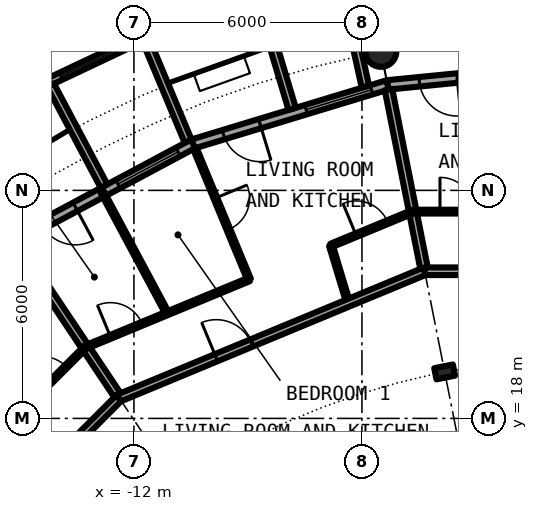
"""IFC4 building model, lengths in metres.
Left out: names, types, materials, properties, quantities, classifications, styles, units other than length and angle.
Written with IfcOpenShell. Run it as: python <this file> out.ifc"""

import sys

from ifc_helpers import new_model, si_unit, direction, frame, frame_2d, origin, origin_2d, place, context, subcontext, project, spatial, rectangle, circle, hollow_circle, i_section, extrude, element, fill, save


model = new_model("IFC4")
c1 = context("Model", 3, precision=1e-05, world=origin(), true_north=direction((0.0, 1.0)))
c2 = subcontext(c1, "Body", "Model", "MODEL_VIEW")
j1 = project(units=[si_unit("LENGTHUNIT", "METRE"), si_unit("PLANEANGLEUNIT", "RADIAN")], contexts=[c1])
p1 = place(None, origin())
s1 = spatial("IfcSite", under=j1, at=p1, CompositionType="ELEMENT")
p2 = place(p1, origin())
s2 = spatial("IfcBuilding", under=s1, at=p2, CompositionType="ELEMENT")
p3 = place(p2, frame((0.0, 0.0, 167.7)))
s3 = spatial("IfcBuildingStorey", under=s2, at=p3, CompositionType="ELEMENT", Elevation=167.7)
p4 = place(p3, frame((-5.501, 27.658, 0.0), z_axis=(0.0, 0.0, 1.0), x_axis=(1.0, 0.0, 0.0)))
e1 = element("IfcColumn", 1, at=p4, inside=s3, PredefinedType="COLUMN", context=c2, shape_type="SweptSolid", body=[
    extrude(hollow_circle(Radius=0.406, WallThickness=0.04, at=origin_2d()), origin(), (0.0, 0.0, 1.0), 3.05),
])
p5 = place(p3, frame((-3.824, 19.223, 0.0), z_axis=(0.0, 0.0, 1.0), x_axis=(-0.195090322016, 0.980785280403, 0.0)))
e2 = element("IfcColumn", 2, at=p5, inside=s3, PredefinedType="COLUMN", context=c2, shape_type="SweptSolid", body=[
    extrude(i_section(OverallWidth=0.3, OverallDepth=0.5, WebThickness=0.014, FlangeThickness=0.028, FilletRadius=0.027, at=origin_2d()), origin(), (0.0, 0.0, 1.0), 3.05),
])
p6 = place(p3, frame((0.0, 27.3, 0.0), z_axis=(0.0, 0.0, 1.0), x_axis=(-0.995173996315, -0.098126026407, 0.0)))
e3 = element("IfcWall", 3, at=p6, inside=s3, PredefinedType="SOLIDWALL", context=c2, shape_type="SweptSolid", body=[
    extrude(rectangle(XDim=5.352, YDim=0.25, at=frame_2d((2.676, 0.0))), origin(), (0.0, 0.0, 1.0), 2.7),
])
p7 = place(p6, frame((0.441, 0.0, 0.3)))
e4 = element("IfcOpeningElement", 4, at=p7, cuts=e3, PredefinedType="OPENING", context=c2, shape_type="SweptSolid", body=[
    extrude(rectangle(XDim=1.8, YDim=2.1, at=frame_2d((0.9, 1.05))), frame((0.0, 0.135, 0.0), z_axis=(0.0, -1.0, 0.0), x_axis=(1.0, 0.0, 0.0)), (0.0, 0.0, 1.0), 0.27),
])
p8 = place(p6, frame((3.51, 0.0, 0.0)))
e5 = element("IfcOpeningElement", 5, at=p8, cuts=e3, PredefinedType="OPENING", context=c2, shape_type="SweptSolid", body=[
    extrude(rectangle(XDim=1.0, YDim=2.2, at=frame_2d((0.5, 1.1))), frame((0.0, 0.135, 0.0), z_axis=(0.0, -1.0, 0.0), x_axis=(1.0, 0.0, 0.0)), (0.0, 0.0, 1.0), 0.27),
])
p9 = place(p3, frame((-5.326, 26.775, 0.0), z_axis=(0.0, 0.0, 1.0), x_axis=(-0.956965678721, -0.290201119486, 0.0)))
e6 = element("IfcWall", 6, at=p9, inside=s3, PredefinedType="SOLIDWALL", context=c2, shape_type="SweptSolid", body=[
    extrude(rectangle(XDim=5.351, YDim=0.25, at=frame_2d((2.676, 0.0))), origin(), (0.0, 0.0, 1.0), 2.7),
])
p10 = place(p9, frame((0.441, 0.0, 0.3)))
e7 = element("IfcOpeningElement", 7, at=p10, cuts=e6, PredefinedType="OPENING", context=c2, shape_type="SweptSolid", body=[
    extrude(rectangle(XDim=1.8, YDim=2.1, at=frame_2d((0.9, 1.05))), frame((0.0, 0.135, 0.0), z_axis=(0.0, -1.0, 0.0), x_axis=(1.0, 0.0, 0.0)), (0.0, 0.0, 1.0), 0.27),
])
p11 = place(p9, frame((3.51, 0.0, 0.0)))
e8 = element("IfcOpeningElement", 8, at=p11, cuts=e6, PredefinedType="OPENING", context=c2, shape_type="SweptSolid", body=[
    extrude(rectangle(XDim=1.0, YDim=2.2, at=frame_2d((0.5, 1.1))), frame((0.0, 0.135, 0.0), z_axis=(0.0, -1.0, 0.0), x_axis=(1.0, 0.0, 0.0)), (0.0, 0.0, 1.0), 0.27),
])
p12 = place(p3, frame((-5.909, 26.729, -0.03), z_axis=(0.0, 0.0, 1.0), x_axis=(-0.216409053917, 0.976302781612, 0.0)))
e9 = element("IfcWall", 9, at=p12, inside=s3, PredefinedType="SOLIDWALL", context=c2, shape_type="SweptSolid", body=[
    extrude(rectangle(XDim=2.925, YDim=0.2, at=frame_2d((1.463, 0.0))), origin(), (0.0, 0.0, 1.0), 2.73),
])
p13 = place(p3, frame((-7.837, 26.144, -0.03), z_axis=(0.0, 0.0, 1.0), x_axis=(-0.287064767992, 0.957911174889, 0.0)))
e10 = element("IfcWall", 10, at=p13, inside=s3, PredefinedType="SOLIDWALL", context=c2, shape_type="SweptSolid", body=[
    extrude(rectangle(XDim=3.006, YDim=0.2, at=frame_2d((1.503, 0.0))), origin(), (0.0, 0.0, 1.0), 2.73),
])
p14 = place(p3, frame((-10.447, 25.222, 0.0), z_axis=(0.0, 0.0, 1.0), x_axis=(-0.881915646801, -0.471407246368, 0.0)))
e11 = element("IfcWall", 11, at=p14, inside=s3, PredefinedType="SOLIDWALL", context=c2, shape_type="SweptSolid", body=[
    extrude(rectangle(XDim=5.352, YDim=0.25, at=frame_2d((2.676, 0.0))), origin(), (0.0, 0.0, 1.0), 2.7),
])
p15 = place(p14, frame((0.441, 0.0, 0.3)))
e12 = element("IfcOpeningElement", 12, at=p15, cuts=e11, PredefinedType="OPENING", context=c2, shape_type="SweptSolid", body=[
    extrude(rectangle(XDim=1.8, YDim=2.1, at=frame_2d((0.9, 1.05))), frame((0.0, 0.135, 0.0), z_axis=(0.0, -1.0, 0.0), x_axis=(1.0, 0.0, 0.0)), (0.0, 0.0, 1.0), 0.27),
])
p16 = place(p14, frame((3.51, 0.0, 0.0)))
e13 = element("IfcOpeningElement", 13, at=p16, cuts=e11, PredefinedType="OPENING", context=c2, shape_type="SweptSolid", body=[
    extrude(rectangle(XDim=1.0, YDim=2.2, at=frame_2d((0.5, 1.1))), frame((0.0, 0.135, 0.0), z_axis=(0.0, -1.0, 0.0), x_axis=(1.0, 0.0, 0.0)), (0.0, 0.0, 1.0), 0.27),
])
p17 = place(p3, frame((-11.629, 28.088, -0.03), z_axis=(0.0, 0.0, 1.0), x_axis=(-0.904000060331, -0.427532327342, 0.0)))
e14 = element("IfcWall", 14, at=p17, inside=s3, PredefinedType="SOLIDWALL", context=c2, shape_type="SweptSolid", body=[
    extrude(rectangle(XDim=2.993, YDim=0.2, at=frame_2d((1.497, 0.0))), origin(), (0.0, 0.0, 1.0), 2.73),
])
p18 = place(p17, frame((0.457, 0.0, 0.33)))
e15 = element("IfcOpeningElement", 15, at=p18, cuts=e14, PredefinedType="OPENING", context=c2, shape_type="SweptSolid", body=[
    extrude(circle(Radius=1.04, at=frame_2d((1.04, 1.04))), frame((0.0, 0.11, 0.0), z_axis=(0.0, -1.0, 0.0), x_axis=(1.0, 0.0, 0.0)), (0.0, 0.0, 1.0), 0.22),
])
p19 = place(p3, frame((-10.575, 25.295, -0.03), z_axis=(0.0, 0.0, 1.0), x_axis=(-0.385697364644, 0.922625353492, 0.0)))
e16 = element("IfcWall", 16, at=p19, inside=s3, PredefinedType="SOLIDWALL", context=c2, shape_type="SweptSolid", body=[
    extrude(rectangle(XDim=2.883, YDim=0.2, at=frame_2d((1.442, 0.0))), origin(), (0.0, 0.0, 1.0), 2.73),
])
p20 = place(p3, frame((-12.787, 24.113, -0.03), z_axis=(0.0, 0.0, 1.0), x_axis=(-0.468365282436, 0.883534924159, 0.0)))
e17 = element("IfcWall", 17, at=p20, inside=s3, PredefinedType="SOLIDWALL", context=c2, shape_type="SweptSolid", body=[
    extrude(rectangle(XDim=3.006, YDim=0.2, at=frame_2d((1.503, 0.0))), origin(), (0.0, 0.0, 1.0), 2.73),
])
p21 = place(p3, frame((-15.098, 22.595, 0.0), z_axis=(0.0, 0.0, 1.0), x_axis=(0.55569370664, -0.831387096605, 0.0)))
e18 = element("IfcWall", 18, at=p21, inside=s3, PredefinedType="PARTITIONING", context=c2, shape_type="SweptSolid", body=[
    extrude(rectangle(XDim=4.875, YDim=0.2, at=frame_2d((2.438, 0.0))), origin(), (0.0, 0.0, 1.0), 2.7),
])
p22 = place(p3, frame((-14.93, 18.222, 0.0), z_axis=(0.0, 0.0, 1.0), x_axis=(0.633633636523, -0.773633255921, 0.0)))
e19 = element("IfcWall", 19, at=p22, inside=s3, PredefinedType="PARTITIONING", context=c2, shape_type="SweptSolid", body=[
    extrude(rectangle(XDim=1.578, YDim=0.1, at=frame_2d((0.789, 0.0))), origin(), (0.0, 0.0, 1.0), 2.7),
])
p23 = place(p3, frame((-12.833, 23.954, 0.0), z_axis=(0.0, 0.0, 1.0), x_axis=(0.472212052488, -0.881484984265, 0.0)))
e20 = element("IfcWall", 20, at=p23, inside=s3, PredefinedType="PARTITIONING", context=c2, shape_type="SweptSolid", body=[
    extrude(rectangle(XDim=3.619, YDim=0.1, at=frame_2d((1.81, 0.0))), origin(), (0.0, 0.0, 1.0), 2.7),
])
p24 = place(p3, frame((-10.399, 25.106, 0.0), z_axis=(0.0, 0.0, 1.0), x_axis=(0.382669377748, -0.923885353999, 0.0)))
e21 = element("IfcWall", 21, at=p24, inside=s3, PredefinedType="PARTITIONING", context=c2, shape_type="SweptSolid", body=[
    extrude(rectangle(XDim=3.734, YDim=0.1, at=frame_2d((1.867, 0.0))), origin(), (0.0, 0.0, 1.0), 2.7),
])
p25 = place(p24, frame((1.417, 0.0, 0.0)))
e22 = element("IfcOpeningElement", 22, at=p25, cuts=e21, PredefinedType="OPENING", context=c2, shape_type="SweptSolid", body=[
    extrude(rectangle(XDim=0.9, YDim=2.3, at=frame_2d((0.45, 1.15))), frame((0.0, 0.06, 0.0), z_axis=(0.0, -1.0, 0.0), x_axis=(1.0, 0.0, 0.0)), (0.0, 0.0, 1.0), 0.12),
])
p26 = place(p3, frame((-6.818, 22.549, 0.0), z_axis=(0.0, 0.0, 1.0), x_axis=(0.289689552287, -0.957120662872, 0.0)))
e23 = element("IfcWall", 23, at=p26, inside=s3, PredefinedType="PARTITIONING", context=c2, shape_type="SweptSolid", body=[
    extrude(rectangle(XDim=1.578, YDim=0.1, at=frame_2d((0.789, 0.0))), origin(), (0.0, 0.0, 1.0), 2.7),
])
p27 = place(p3, frame((-5.302, 26.653, 0.0), z_axis=(0.0, 0.0, 1.0), x_axis=(0.195075825861, -0.980788163756, 0.0)))
e24 = element("IfcWall", 24, at=p27, inside=s3, PredefinedType="PARTITIONING", context=c2, shape_type="SweptSolid", body=[
    extrude(rectangle(XDim=4.875, YDim=0.2, at=frame_2d((2.438, 0.0))), origin(), (0.0, 0.0, 1.0), 2.7),
])
p28 = place(p3, frame((-18.542, 12.389, 0.0), z_axis=(0.0, 0.0, 1.0), x_axis=(0.707106781187, 0.707106781187, 0.0)))
e25 = element("IfcWall", 25, at=p28, inside=s3, PredefinedType="PARTITIONING", context=c2, shape_type="SweptSolid", body=[
    extrude(rectangle(XDim=8.702, YDim=0.2, at=frame_2d((4.351, 0.0))), origin(), (0.0, 0.0, 1.0), 2.7),
])
p29 = place(p28, frame((2.763, 0.0, 0.0)))
e26 = element("IfcOpeningElement", 26, at=p29, cuts=e25, PredefinedType="OPENING", context=c2, shape_type="SweptSolid", body=[
    extrude(rectangle(XDim=1.0, YDim=2.3, at=frame_2d((0.5, 1.15))), frame((0.0, 0.11, 0.0), z_axis=(0.0, -1.0, 0.0), x_axis=(1.0, 0.0, 0.0)), (0.0, 0.0, 1.0), 0.22),
])
p30 = place(p3, frame((-12.396, 18.536, 0.0), z_axis=(0.0, 0.0, 1.0), x_axis=(0.923722518166, 0.383062278792, 0.0)))
e27 = element("IfcWall", 27, at=p30, inside=s3, PredefinedType="PARTITIONING", context=c2, shape_type="SweptSolid", body=[
    extrude(rectangle(XDim=8.709, YDim=0.2, at=frame_2d((4.354, 0.0))), origin(), (0.0, 0.0, 1.0), 2.7),
])
p31 = place(p30, frame((2.772, 0.0, 0.0)))
e28 = element("IfcOpeningElement", 28, at=p31, cuts=e27, PredefinedType="OPENING", context=c2, shape_type="SweptSolid", body=[
    extrude(rectangle(XDim=1.0, YDim=2.3, at=frame_2d((0.5, 1.15))), frame((0.0, 0.11, 0.0), z_axis=(0.0, -1.0, 0.0), x_axis=(1.0, 0.0, 0.0)), (0.0, 0.0, 1.0), 0.22),
])
p32 = place(p3, frame((-4.351, 21.872, 0.0), z_axis=(0.0, 0.0, 1.0), x_axis=(1.0, 0.0, 0.0)))
e29 = element("IfcWall", 29, at=p32, inside=s3, PredefinedType="PARTITIONING", context=c2, shape_type="SweptSolid", body=[
    extrude(rectangle(XDim=8.702, YDim=0.2, at=frame_2d((4.351, 0.0))), origin(), (0.0, 0.0, 1.0), 2.7),
])
p33 = place(p32, frame((4.939, 0.0, 0.0)))
e30 = element("IfcOpeningElement", 30, at=p33, cuts=e29, PredefinedType="OPENING", context=c2, shape_type="SweptSolid", body=[
    extrude(rectangle(XDim=1.0, YDim=2.3, at=frame_2d((0.5, 1.15))), frame((0.0, 0.11, 0.0), z_axis=(0.0, -1.0, 0.0), x_axis=(1.0, 0.0, 0.0)), (0.0, 0.0, 1.0), 0.22),
])
p34 = place(p3, frame((-14.932, 18.218, 0.0), z_axis=(0.0, 0.0, 1.0), x_axis=(0.707106781187, 0.707106781187, 0.0)))
e31 = element("IfcWall", 31, at=p34, inside=s3, PredefinedType="PARTITIONING", context=c2, shape_type="SweptSolid", body=[
    extrude(rectangle(XDim=2.332, YDim=0.1, at=frame_2d((1.166, 0.0))), origin(), (0.0, 0.0, 1.0), 2.7),
])
p35 = place(p34, frame((0.723, 0.0, 0.0)))
e32 = element("IfcOpeningElement", 32, at=p35, cuts=e31, PredefinedType="OPENING", context=c2, shape_type="SweptSolid", body=[
    extrude(rectangle(XDim=0.9, YDim=2.3, at=frame_2d((0.45, 1.15))), frame((0.0, 0.06, 0.0), z_axis=(0.0, -1.0, 0.0), x_axis=(1.0, 0.0, 0.0)), (0.0, 0.0, 1.0), 0.12),
])
p36 = place(p3, frame((-13.278, 19.872, 0.0), z_axis=(0.0, 0.0, 1.0), x_axis=(0.923920484476, 0.38258455061, 0.0)))
e33 = element("IfcWall", 33, at=p36, inside=s3, PredefinedType="PARTITIONING", context=c2, shape_type="SweptSolid", body=[
    extrude(rectangle(XDim=4.663, YDim=0.1, at=frame_2d((2.332, 0.0))), origin(), (0.0, 0.0, 1.0), 2.7),
])
p37 = place(p36, frame((0.716, 0.0, 0.0)))
e34 = element("IfcOpeningElement", 34, at=p37, cuts=e33, PredefinedType="OPENING", context=c2, shape_type="SweptSolid", body=[
    extrude(rectangle(XDim=0.9, YDim=2.3, at=frame_2d((0.45, 1.15))), frame((0.0, 0.06, 0.0), z_axis=(0.0, -1.0, 0.0), x_axis=(1.0, 0.0, 0.0)), (0.0, 0.0, 1.0), 0.12),
])
p38 = place(p3, frame((-6.817, 22.548, 0.0), z_axis=(0.0, 0.0, 1.0), x_axis=(0.924061443507, 0.382243964798, 0.0)))
e35 = element("IfcWall", 35, at=p38, inside=s3, PredefinedType="PARTITIONING", context=c2, shape_type="SweptSolid", body=[
    extrude(rectangle(XDim=2.333, YDim=0.1, at=frame_2d((1.167, 0.0))), origin(), (0.0, 0.0, 1.0), 2.7),
])
p39 = place(p38, frame((0.717, 0.0, 0.0)))
e36 = element("IfcOpeningElement", 36, at=p39, cuts=e35, PredefinedType="OPENING", context=c2, shape_type="SweptSolid", body=[
    extrude(rectangle(XDim=0.9, YDim=2.3, at=frame_2d((0.45, 1.15))), frame((0.0, 0.06, 0.0), z_axis=(0.0, -1.0, 0.0), x_axis=(1.0, 0.0, 0.0)), (0.0, 0.0, 1.0), 0.12),
])
p40 = place(p3, frame((-4.663, 23.441, 0.0), z_axis=(0.0, 0.0, 1.0), x_axis=(1.0, 0.0, 0.0)))
e37 = element("IfcWall", 37, at=p40, inside=s3, PredefinedType="PARTITIONING", context=c2, shape_type="SweptSolid", body=[
    extrude(rectangle(XDim=2.332, YDim=0.1, at=frame_2d((1.166, 0.0))), origin(), (0.0, 0.0, 1.0), 2.7),
])
p41 = place(p40, frame((0.716, 0.0, 0.0)))
e38 = element("IfcOpeningElement", 38, at=p41, cuts=e37, PredefinedType="OPENING", context=c2, shape_type="SweptSolid", body=[
    extrude(rectangle(XDim=0.9, YDim=2.3, at=frame_2d((0.45, 1.15))), frame((0.0, 0.06, 0.0), z_axis=(0.0, -1.0, 0.0), x_axis=(1.0, 0.0, 0.0)), (0.0, 0.0, 1.0), 0.12),
])
p42 = place(p8, origin())
e39 = element("IfcDoor", 39, at=p42, inside=s3, OperationType="SINGLE_SWING_LEFT", PredefinedType="DOOR", context=c2, shape_type="SweptSolid", body=[
    extrude(rectangle(XDim=1.0, YDim=2.2, at=frame_2d((0.5, 1.1))), frame((0.0, 0.025, 0.0), z_axis=(0.0, -1.0, 0.0), x_axis=(1.0, 0.0, 0.0)), (0.0, 0.0, 1.0), 0.05),
])
fill(e5, e39)
p43 = place(p10, origin())
e40 = element("IfcWindow", 40, at=p43, inside=s3, PartitioningType="SINGLE_PANEL", PredefinedType="WINDOW", context=c2, shape_type="SweptSolid", body=[
    extrude(rectangle(XDim=1.8, YDim=2.1, at=frame_2d((0.9, 1.05))), frame((0.0, 0.03, 0.0), z_axis=(0.0, -1.0, 0.0), x_axis=(1.0, 0.0, 0.0)), (0.0, 0.0, 1.0), 0.06),
])
fill(e7, e40)
p44 = place(p11, origin())
e41 = element("IfcDoor", 41, at=p44, inside=s3, OperationType="SINGLE_SWING_LEFT", PredefinedType="DOOR", context=c2, shape_type="SweptSolid", body=[
    extrude(rectangle(XDim=1.0, YDim=2.2, at=frame_2d((0.5, 1.1))), frame((0.0, 0.025, 0.0), z_axis=(0.0, -1.0, 0.0), x_axis=(1.0, 0.0, 0.0)), (0.0, 0.0, 1.0), 0.05),
])
fill(e8, e41)
p45 = place(p15, origin())
e42 = element("IfcWindow", 42, at=p45, inside=s3, PartitioningType="SINGLE_PANEL", PredefinedType="WINDOW", context=c2, shape_type="SweptSolid", body=[
    extrude(rectangle(XDim=1.8, YDim=2.1, at=frame_2d((0.9, 1.05))), frame((0.0, 0.03, 0.0), z_axis=(0.0, -1.0, 0.0), x_axis=(1.0, 0.0, 0.0)), (0.0, 0.0, 1.0), 0.06),
])
fill(e12, e42)
p46 = place(p18, origin())
e43 = element("IfcWindow", 43, at=p46, inside=s3, PartitioningType="SINGLE_PANEL", PredefinedType="WINDOW", context=c2, shape_type="SweptSolid", body=[
    extrude(circle(Radius=1.04, at=frame_2d((1.04, 1.04))), frame((0.0, 0.03, 0.0), z_axis=(0.0, -1.0, 0.0), x_axis=(1.0, 0.0, 0.0)), (0.0, 0.0, 1.0), 0.06),
])
fill(e15, e43)
p47 = place(p16, origin())
e44 = element("IfcDoor", 44, at=p47, inside=s3, OperationType="SINGLE_SWING_LEFT", PredefinedType="DOOR", context=c2, shape_type="SweptSolid", body=[
    extrude(rectangle(XDim=1.0, YDim=2.2, at=frame_2d((0.5, 1.1))), frame((0.0, 0.025, 0.0), z_axis=(0.0, -1.0, 0.0), x_axis=(1.0, 0.0, 0.0)), (0.0, 0.0, 1.0), 0.05),
])
fill(e13, e44)
p48 = place(p41, origin())
e45 = element("IfcDoor", 45, at=p48, inside=s3, OperationType="SINGLE_SWING_RIGHT", PredefinedType="DOOR", context=c2, shape_type="SweptSolid", body=[
    extrude(rectangle(XDim=0.9, YDim=2.3, at=frame_2d((0.45, 1.15))), frame((0.0, 0.025, 0.0), z_axis=(0.0, -1.0, 0.0), x_axis=(1.0, 0.0, 0.0)), (0.0, 0.0, 1.0), 0.05),
])
fill(e38, e45)
p49 = place(p31, origin())
e46 = element("IfcDoor", 46, at=p49, inside=s3, OperationType="SINGLE_SWING_LEFT", PredefinedType="DOOR", context=c2, shape_type="SweptSolid", body=[
    extrude(rectangle(XDim=1.0, YDim=2.3, at=frame_2d((0.5, 1.15))), frame((0.0, 0.025, 0.0), z_axis=(0.0, -1.0, 0.0), x_axis=(1.0, 0.0, 0.0)), (0.0, 0.0, 1.0), 0.05),
])
fill(e28, e46)
p50 = place(p39, origin())
e47 = element("IfcDoor", 47, at=p50, inside=s3, OperationType="SINGLE_SWING_RIGHT", PredefinedType="DOOR", context=c2, shape_type="SweptSolid", body=[
    extrude(rectangle(XDim=0.9, YDim=2.3, at=frame_2d((0.45, 1.15))), frame((0.0, 0.025, 0.0), z_axis=(0.0, -1.0, 0.0), x_axis=(1.0, 0.0, 0.0)), (0.0, 0.0, 1.0), 0.05),
])
fill(e36, e47)
p51 = place(p25, origin())
e48 = element("IfcDoor", 48, at=p51, inside=s3, OperationType="SINGLE_SWING_RIGHT", PredefinedType="DOOR", context=c2, shape_type="SweptSolid", body=[
    extrude(rectangle(XDim=0.9, YDim=2.3, at=frame_2d((0.45, 1.15))), frame((0.0, 0.025, 0.0), z_axis=(0.0, -1.0, 0.0), x_axis=(1.0, 0.0, 0.0)), (0.0, 0.0, 1.0), 0.05),
])
fill(e22, e48)
p52 = place(p37, origin())
e49 = element("IfcDoor", 49, at=p52, inside=s3, OperationType="SINGLE_SWING_LEFT", PredefinedType="DOOR", context=c2, shape_type="SweptSolid", body=[
    extrude(rectangle(XDim=0.9, YDim=2.3, at=frame_2d((0.45, 1.15))), frame((0.0, 0.025, 0.0), z_axis=(0.0, -1.0, 0.0), x_axis=(1.0, 0.0, 0.0)), (0.0, 0.0, 1.0), 0.05),
])
fill(e34, e49)
p53 = place(p35, origin())
e50 = element("IfcDoor", 50, at=p53, inside=s3, OperationType="SINGLE_SWING_RIGHT", PredefinedType="DOOR", context=c2, shape_type="SweptSolid", body=[
    extrude(rectangle(XDim=0.9, YDim=2.3, at=frame_2d((0.45, 1.15))), frame((0.0, 0.025, 0.0), z_axis=(0.0, -1.0, 0.0), x_axis=(1.0, 0.0, 0.0)), (0.0, 0.0, 1.0), 0.05),
])
fill(e32, e50)
save(model, sys.argv[1])
